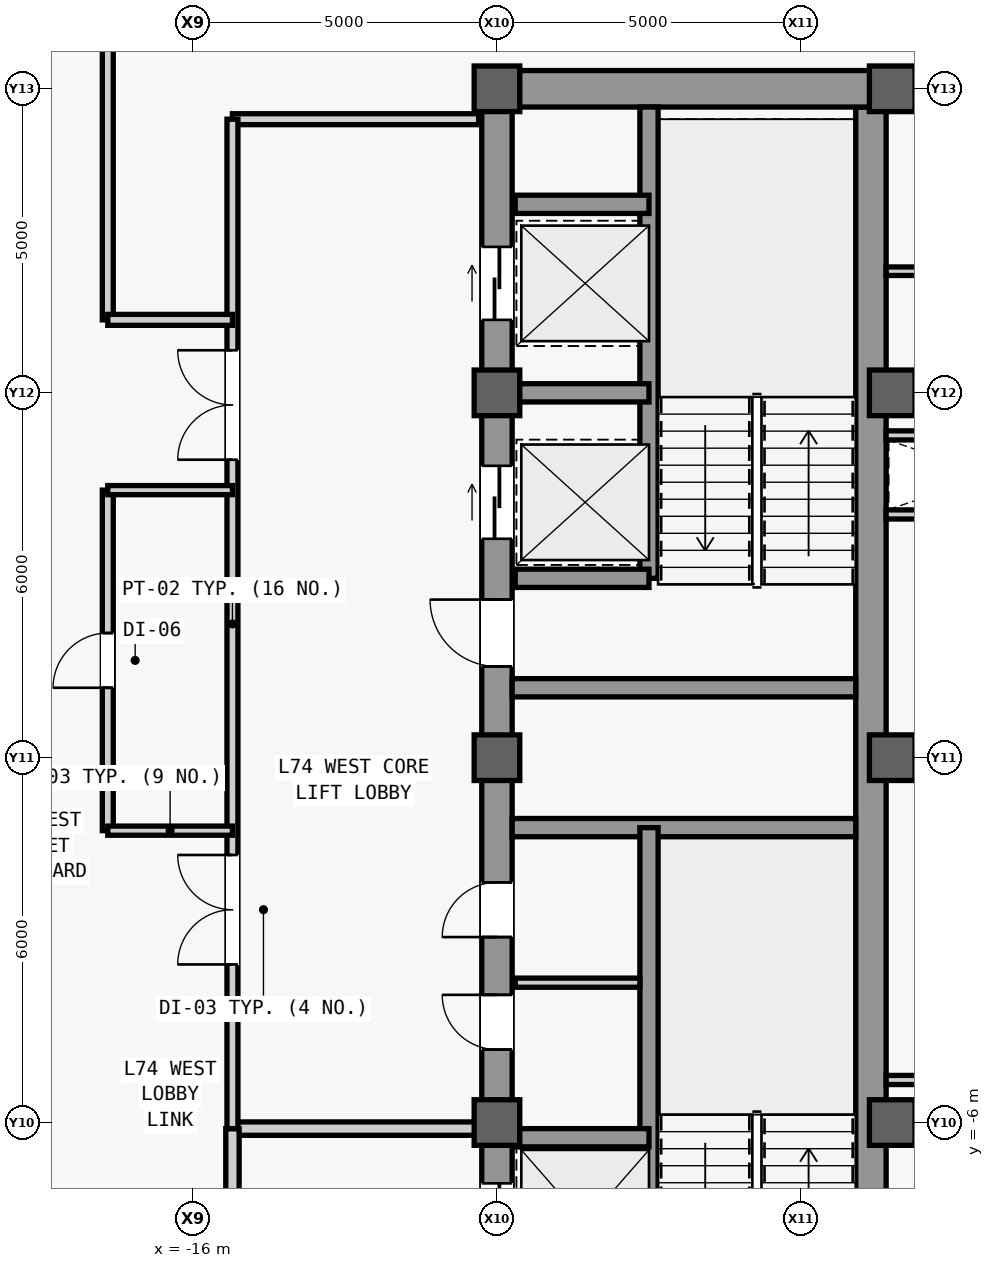
"""IFC4 building model, lengths in metres.
Left out: names, types, materials, properties, quantities, classifications, styles, units other than length and angle.
Written with IfcOpenShell. Run it as: python <this file> out.ifc"""

import sys

from ifc_helpers import new_model, si_unit, direction, frame, frame_2d, origin, origin_2d, place, context, subcontext, project, spatial, rectangle, extrude, source, transform, mapped, element, fill, save


model = new_model("IFC4")
c1 = context("Model", 3, precision=1e-05, world=origin(), true_north=direction((0.0, 1.0)))
c2 = subcontext(c1, "Body", "Model", "MODEL_VIEW")
j1 = project(units=[si_unit("LENGTHUNIT", "METRE"), si_unit("PLANEANGLEUNIT", "RADIAN")], contexts=[c1])
p1 = place(None, origin())
s1 = spatial("IfcSite", under=j1, at=p1, CompositionType="ELEMENT")
p2 = place(p1, origin())
s2 = spatial("IfcBuilding", under=s1, at=p2, CompositionType="ELEMENT")
p3 = place(p2, frame((0.0, 0.0, 313.5)))
s3 = spatial("IfcBuildingStorey", under=s2, at=p3, CompositionType="ELEMENT", Elevation=313.5)
m1 = source(origin(), c2, "Body", "SweptSolid", [
    extrude(rectangle(XDim=22.0, YDim=0.5, at=frame_2d((11.0, 0.0))), origin(), (0.0, 0.0, 1.0), 3.78),
])
p4 = place(p3, frame((-11.0, -11.0, 0.0), z_axis=(0.0, 0.0, 1.0), x_axis=(0.0, 1.0, 0.0)))
e1 = element("IfcWall", 1, at=p4, inside=s3, PredefinedType="SHEAR", context=c2, shape_type="MappedRepresentation", body=[
    mapped(m1, transform((0.0, 0.0, 0.0), scale=1.0)),
])
m2 = source(origin(), c2, "Body", "SweptSolid", [
    extrude(rectangle(XDim=1.1, YDim=2.2, at=frame_2d((0.55, 1.1))), frame((0.0, 0.26, 0.0), z_axis=(0.0, -1.0, 0.0), x_axis=(1.0, 0.0, 0.0)), (0.0, 0.0, 1.0), 0.52),
])
p5 = place(p4, frame((0.8, 0.0, 0.0)))
e2 = element("IfcOpeningElement", 2, at=p5, cuts=e1, PredefinedType="OPENING", context=c2, shape_type="MappedRepresentation", body=[
    mapped(m2, transform((0.0, 0.0, 0.0), scale=1.0)),
])
p6 = place(p4, frame((12.5, 0.0, 0.0)))
e3 = element("IfcOpeningElement", 3, at=p6, cuts=e1, PredefinedType="OPENING", context=c2, shape_type="MappedRepresentation", body=[
    mapped(m2, transform((0.0, 0.0, 0.0), scale=1.0)),
])
m3 = source(origin(), c2, "Body", "SweptSolid", [
    extrude(rectangle(XDim=0.9, YDim=2.15, at=frame_2d((0.45, 1.075))), frame((0.0, 0.26, 0.0), z_axis=(0.0, -1.0, 0.0), x_axis=(1.0, 0.0, 0.0)), (0.0, 0.0, 1.0), 0.52),
])
p7 = place(p4, frame((6.2, 0.0, 0.0)))
e4 = element("IfcOpeningElement", 4, at=p7, cuts=e1, PredefinedType="OPENING", context=c2, shape_type="MappedRepresentation", body=[
    mapped(m3, transform((0.0, 0.0, 0.0), scale=1.0)),
])
p8 = place(p4, frame((8.05, 0.0, 0.0)))
e5 = element("IfcOpeningElement", 5, at=p8, cuts=e1, PredefinedType="OPENING", context=c2, shape_type="MappedRepresentation", body=[
    mapped(m3, transform((0.0, 0.0, 0.0), scale=1.0)),
])
m4 = source(origin(), c2, "Body", "SweptSolid", [
    extrude(rectangle(XDim=1.2, YDim=2.3, at=frame_2d((0.6, 1.15))), frame((0.0, 0.26, 0.0), z_axis=(0.0, -1.0, 0.0), x_axis=(1.0, 0.0, 0.0)), (0.0, 0.0, 1.0), 0.52),
])
p9 = place(p4, frame((14.6, 0.0, 0.0)))
e6 = element("IfcOpeningElement", 6, at=p9, cuts=e1, PredefinedType="OPENING", context=c2, shape_type="MappedRepresentation", body=[
    mapped(m4, transform((0.0, 0.0, 0.0), scale=1.0)),
])
p10 = place(p4, frame((18.2, 0.0, 0.0)))
e7 = element("IfcOpeningElement", 7, at=p10, cuts=e1, PredefinedType="OPENING", context=c2, shape_type="MappedRepresentation", body=[
    mapped(m4, transform((0.0, 0.0, 0.0), scale=1.0)),
])
m5 = source(origin(), c2, "Body", "SweptSolid", [
    extrude(rectangle(XDim=1.3, YDim=2.3, at=frame_2d((0.65, 1.15))), frame((0.0, 0.26, 0.0), z_axis=(0.0, -1.0, 0.0), x_axis=(1.0, 0.0, 0.0)), (0.0, 0.0, 1.0), 0.52),
])
p11 = place(p4, frame((2.7, 0.0, 0.0)))
e8 = element("IfcOpeningElement", 8, at=p11, cuts=e1, PredefinedType="OPENING", context=c2, shape_type="MappedRepresentation", body=[
    mapped(m5, transform((0.0, 0.0, 0.0), scale=1.0)),
])
m6 = source(origin(), c2, "Body", "SweptSolid", [
    extrude(rectangle(XDim=21.4, YDim=0.5, at=frame_2d((10.7, 0.0))), origin(), (0.0, 0.0, 1.0), 3.78),
])
p12 = place(p3, frame((-4.85, -10.7, 0.0), z_axis=(0.0, 0.0, 1.0), x_axis=(0.0, 1.0, 0.0)))
e9 = element("IfcWall", 9, at=p12, inside=s3, PredefinedType="SHEAR", context=c2, shape_type="MappedRepresentation", body=[
    mapped(m6, transform((0.0, 0.0, 0.0), scale=1.0)),
])
m7 = source(origin(), c2, "Body", "SweptSolid", [
    extrude(rectangle(XDim=5.9, YDim=0.6, at=frame_2d((2.95, 0.0))), origin(), (0.0, 0.0, 1.0), 3.78),
])
p13 = place(p3, frame((-10.75, 11.0, 0.0), z_axis=(0.0, 0.0, 1.0), x_axis=(1.0, 0.0, 0.0)))
e10 = element("IfcWall", 10, at=p13, inside=s3, PredefinedType="SHEAR", context=c2, shape_type="MappedRepresentation", body=[
    mapped(m7, transform((0.0, 0.0, 0.0), scale=1.0)),
])
m8 = source(origin(), c2, "Body", "SweptSolid", [
    extrude(rectangle(XDim=5.65, YDim=0.3, at=frame_2d((2.825, 0.0))), origin(), (0.0, 0.0, 1.0), 3.78),
])
for number, where, z_axis, x_axis in (
    (11, (-10.75, -1.15, 0.0), (0.0, 0.0, 1.0), (1.0, 0.0, 0.0)),
    (12, (-10.75, 1.15, 0.0), (0.0, 0.0, 1.0), (1.0, 0.0, 0.0)),
):
    element("IfcWall", number, at=place(p3, frame(where, z_axis=z_axis, x_axis=x_axis)), inside=s3, PredefinedType="SHEAR", context=c2, shape_type="MappedRepresentation", body=[
        mapped(m8, transform((0.0, 0.0, 0.0), scale=1.0)),
    ])
m9 = source(origin(), c2, "Body", "SweptSolid", [
    extrude(rectangle(XDim=9.2, YDim=0.5, at=frame_2d((4.6, 0.0))), origin(), (0.0, 0.0, 1.0), 3.78),
])
p14 = place(p3, frame((-4.6, 11.0, 0.0), z_axis=(0.0, 0.0, 1.0), x_axis=(1.0, 0.0, 0.0)))
e13 = element("IfcWall", 13, at=p14, inside=s3, PredefinedType="SHEAR", context=c2, shape_type="MappedRepresentation", body=[
    mapped(m9, transform((0.0, 0.0, 0.0), scale=1.0)),
])
m10 = source(origin(), c2, "Body", "SweptSolid", [
    extrude(rectangle(XDim=0.75, YDim=0.75, at=origin_2d()), origin(), (0.0, 0.0, 1.0), 4.0),
])
for number, where, z_axis, x_axis in (
    (14, (-11.0, -6.0, 0.0), (0.0, 0.0, 1.0), (1.0, 0.0, 0.0)),
    (15, (-11.0, 0.0, 0.0), (0.0, 0.0, 1.0), (1.0, 0.0, 0.0)),
    (16, (-11.0, 6.0, 0.0), (0.0, 0.0, 1.0), (1.0, 0.0, 0.0)),
    (17, (-11.0, 11.0, 0.0), (0.0, 0.0, 1.0), (1.0, 0.0, 0.0)),
    (18, (-4.5, -6.0, 0.0), (0.0, 0.0, 1.0), (1.0, 0.0, 0.0)),
    (19, (-4.5, 0.0, 0.0), (0.0, 0.0, 1.0), (1.0, 0.0, 0.0)),
    (20, (-4.5, 6.0, 0.0), (0.0, 0.0, 1.0), (1.0, 0.0, 0.0)),
    (21, (-4.5, 11.0, 0.0), (0.0, 0.0, 1.0), (1.0, 0.0, 0.0)),
):
    element("IfcColumn", number, at=place(p3, frame(where, z_axis=z_axis, x_axis=x_axis)), inside=s3, PredefinedType="COLUMN", context=c2, shape_type="MappedRepresentation", body=[
        mapped(m10, transform((0.0, 0.0, 0.0), scale=1.0)),
    ])
m11 = source(origin(), c2, "Body", "SweptSolid", [
    extrude(rectangle(XDim=7.8, YDim=0.3, at=frame_2d((3.9, 0.0))), origin(), (0.0, 0.0, 1.0), 3.78),
])
p15 = place(p3, frame((-8.5, -8.95, 0.0), z_axis=(0.0, 0.0, 1.0), x_axis=(0.0, 1.0, 0.0)))
e22 = element("IfcWall", 22, at=p15, inside=s3, PredefinedType="SHEAR", context=c2, shape_type="MappedRepresentation", body=[
    mapped(m11, transform((0.0, 0.0, 0.0), scale=1.0)),
])
m12 = source(origin(), c2, "Body", "SweptSolid", [
    extrude(rectangle(XDim=2.2, YDim=0.3, at=frame_2d((1.1, 0.0))), origin(), (0.0, 0.0, 1.0), 3.78),
])
p16 = place(p3, frame((-10.7, -6.25, 0.0), z_axis=(0.0, 0.0, 1.0), x_axis=(1.0, 0.0, 0.0)))
e23 = element("IfcWall", 23, at=p16, inside=s3, PredefinedType="SHEAR", context=c2, shape_type="MappedRepresentation", body=[
    mapped(m12, transform((0.0, 0.0, 0.0), scale=1.0)),
])
m13 = source(origin(), c2, "Body", "SweptSolid", [
    extrude(rectangle(XDim=7.75, YDim=0.3, at=frame_2d((3.875, 0.0))), origin(), (0.0, 0.0, 1.0), 3.78),
])
p17 = place(p3, frame((-8.5, 2.95, 0.0), z_axis=(0.0, 0.0, 1.0), x_axis=(0.0, 1.0, 0.0)))
e24 = element("IfcWall", 24, at=p17, inside=s3, PredefinedType="SHEAR", context=c2, shape_type="MappedRepresentation", body=[
    mapped(m13, transform((0.0, 0.0, 0.0), scale=1.0)),
])
for number, where, z_axis, x_axis in (
    (25, (-10.7, 2.95, 0.0), (0.0, 0.0, 1.0), (1.0, 0.0, 0.0)),
    (26, (-10.7, 6.0, 0.0), (0.0, 0.0, 1.0), (1.0, 0.0, 0.0)),
    (27, (-10.7, 9.1, 0.0), (0.0, 0.0, 1.0), (1.0, 0.0, 0.0)),
):
    element("IfcWall", number, at=place(p3, frame(where, z_axis=z_axis, x_axis=x_axis)), inside=s3, PredefinedType="SHEAR", context=c2, shape_type="MappedRepresentation", body=[
        mapped(m12, transform((0.0, 0.0, 0.0), scale=1.0)),
    ])
m14 = source(origin(), c2, "Body", "SweptSolid", [
    extrude(rectangle(XDim=2.05, YDim=0.15, at=frame_2d((1.025, 0.0))), origin(), (0.0, 0.0, 1.0), 3.78),
])
p18 = place(p3, frame((-10.7, -3.7, 0.0), z_axis=(0.0, 0.0, 1.0), x_axis=(1.0, 0.0, 0.0)))
e28 = element("IfcWall", 28, at=p18, inside=s3, PredefinedType="PARTITIONING", context=c2, shape_type="MappedRepresentation", body=[
    mapped(m14, transform((0.0, 0.0, 0.0), scale=1.0)),
])
m15 = source(origin(), c2, "Body", "SweptSolid", [
    extrude(rectangle(XDim=4.05, YDim=0.22, at=frame_2d((2.025, 0.0))), origin(), (0.0, 0.0, 1.0), 3.085),
])
p19 = place(p3, frame((-15.35, -6.1, 0.0), z_axis=(0.0, 0.0, 1.0), x_axis=(1.0, 0.0, 0.0)))
e29 = element("IfcWall", 29, at=p19, inside=s3, PredefinedType="PARTITIONING", context=c2, shape_type="MappedRepresentation", body=[
    mapped(m15, transform((0.0, 0.0, 0.0), scale=1.0)),
])
m16 = source(origin(), c2, "Body", "SweptSolid", [
    extrude(rectangle(XDim=4.4, YDim=0.22, at=frame_2d((2.2, 0.0))), origin(), (0.0, 0.0, 1.0), 3.78),
])
p20 = place(p3, frame((-15.35, -10.5, 0.0), z_axis=(0.0, 0.0, 1.0), x_axis=(0.0, 1.0, 0.0)))
e30 = element("IfcWall", 30, at=p20, inside=s3, PredefinedType="PARTITIONING", context=c2, shape_type="MappedRepresentation", body=[
    mapped(m16, transform((0.0, 0.0, 0.0), scale=1.0)),
])
m17 = source(origin(), c2, "Body", "SweptSolid", [
    extrude(rectangle(XDim=1.2, YDim=2.2, at=frame_2d((0.6, 1.1))), frame((0.0, 0.12, 0.0), z_axis=(0.0, -1.0, 0.0), x_axis=(1.0, 0.0, 0.0)), (0.0, 0.0, 1.0), 0.24),
])
p21 = place(p20, frame((1.6, 0.0, 0.0)))
e31 = element("IfcOpeningElement", 31, at=p21, cuts=e30, PredefinedType="OPENING", context=c2, shape_type="MappedRepresentation", body=[
    mapped(m17, transform((0.0, 0.0, 0.0), scale=1.0)),
])
m18 = source(origin(), c2, "Body", "SweptSolid", [
    extrude(rectangle(XDim=4.05, YDim=0.18, at=frame_2d((2.025, 0.0))), origin(), (0.0, 0.0, 1.0), 3.78),
])
p22 = place(p3, frame((-15.35, 10.5, 0.0), z_axis=(0.0, 0.0, 1.0), x_axis=(1.0, 0.0, 0.0)))
e32 = element("IfcWall", 32, at=p22, inside=s3, PredefinedType="PARTITIONING", context=c2, shape_type="MappedRepresentation", body=[
    mapped(m18, transform((0.0, 0.0, 0.0), scale=1.0)),
])
m19 = source(origin(), c2, "Body", "SweptSolid", [
    extrude(rectangle(XDim=16.6, YDim=0.18, at=frame_2d((8.3, 0.0))), origin(), (0.0, 0.0, 1.0), 3.78),
])
p23 = place(p3, frame((-15.35, -6.1, 0.0), z_axis=(0.0, 0.0, 1.0), x_axis=(0.0, 1.0, 0.0)))
e33 = element("IfcWall", 33, at=p23, inside=s3, PredefinedType="PARTITIONING", context=c2, shape_type="MappedRepresentation", body=[
    mapped(m19, transform((0.0, 0.0, 0.0), scale=1.0)),
])
m20 = source(origin(), c2, "Body", "SweptSolid", [
    extrude(rectangle(XDim=1.8, YDim=2.25, at=frame_2d((0.9, 1.125))), frame((0.0, 0.1, 0.0), z_axis=(0.0, -1.0, 0.0), x_axis=(1.0, 0.0, 0.0)), (0.0, 0.0, 1.0), 0.2),
])
p24 = place(p23, frame((2.7, 0.0, 0.0)))
e34 = element("IfcOpeningElement", 34, at=p24, cuts=e33, PredefinedType="OPENING", context=c2, shape_type="MappedRepresentation", body=[
    mapped(m20, transform((0.0, 0.0, 0.0), scale=1.0)),
])
p25 = place(p23, frame((11.0, 0.0, 0.0)))
e35 = element("IfcOpeningElement", 35, at=p25, cuts=e33, PredefinedType="OPENING", context=c2, shape_type="MappedRepresentation", body=[
    mapped(m20, transform((0.0, 0.0, 0.0), scale=1.0)),
])
m21 = source(origin(), c2, "Body", "SweptSolid", [
    extrude(rectangle(XDim=3.45, YDim=0.15, at=frame_2d((1.725, 0.0))), origin(), (0.0, 0.0, 1.0), 3.78),
])
for number, where, z_axis, x_axis in (
    (36, (-4.6, 4.0, 0.0), (0.0, 0.0, 1.0), (1.0, 0.0, 0.0)),
    (37, (-4.6, -5.3, 0.0), (0.0, 0.0, 1.0), (1.0, 0.0, 0.0)),
):
    element("IfcWall", number, at=place(p3, frame(where, z_axis=z_axis, x_axis=x_axis)), inside=s3, PredefinedType="PARTITIONING", context=c2, shape_type="MappedRepresentation", body=[
        mapped(m21, transform((0.0, 0.0, 0.0), scale=1.0)),
    ])
m22 = source(origin(), c2, "Body", "SweptSolid", [
    extrude(rectangle(XDim=3.45, YDim=0.14, at=frame_2d((1.725, 0.0))), origin(), (0.0, 0.0, 1.0), 3.78),
])
p26 = place(p3, frame((-4.6, 8.0, 0.0), z_axis=(0.0, 0.0, 1.0), x_axis=(1.0, 0.0, 0.0)))
e38 = element("IfcWall", 38, at=p26, inside=s3, PredefinedType="PARTITIONING", context=c2, shape_type="MappedRepresentation", body=[
    mapped(m22, transform((0.0, 0.0, 0.0), scale=1.0)),
])
p27 = place(p3, frame((-4.6, 5.3, 0.0), z_axis=(0.0, 0.0, 1.0), x_axis=(1.0, 0.0, 0.0)))
e39 = element("IfcWall", 39, at=p27, inside=s3, PredefinedType="PARTITIONING", context=c2, shape_type="MappedRepresentation", body=[
    mapped(m21, transform((0.0, 0.0, 0.0), scale=1.0)),
])
m23 = source(origin(), c2, "Body", "SweptSolid", [
    extrude(rectangle(XDim=5.6, YDim=0.18, at=frame_2d((2.8, 0.0))), origin(), (0.0, 0.0, 1.0), 3.78),
])
p28 = place(p3, frame((-17.4, -1.2, 0.0), z_axis=(0.0, 0.0, 1.0), x_axis=(0.0, 1.0, 0.0)))
e40 = element("IfcWall", 40, at=p28, inside=s3, PredefinedType="PARTITIONING", context=c2, shape_type="MappedRepresentation", body=[
    mapped(m23, transform((0.0, 0.0, 0.0), scale=1.0)),
])
m24 = source(origin(), c2, "Body", "SweptSolid", [
    extrude(rectangle(XDim=0.9, YDim=2.15, at=frame_2d((0.45, 1.075))), frame((0.0, 0.1, 0.0), z_axis=(0.0, -1.0, 0.0), x_axis=(1.0, 0.0, 0.0)), (0.0, 0.0, 1.0), 0.2),
])
p29 = place(p28, frame((2.35, 0.0, 0.0)))
e41 = element("IfcOpeningElement", 41, at=p29, cuts=e40, PredefinedType="OPENING", context=c2, shape_type="MappedRepresentation", body=[
    mapped(m24, transform((0.0, 0.0, 0.0), scale=1.0)),
])
m25 = source(origin(), c2, "Body", "SweptSolid", [
    extrude(rectangle(XDim=2.05, YDim=0.15, at=frame_2d((1.025, 0.0))), origin(), (0.0, 0.0, 1.0), 3.78),
])
for number, where, z_axis, x_axis in (
    (42, (-17.4, -1.2, 0.0), (0.0, 0.0, 1.0), (1.0, 0.0, 0.0)),
    (43, (-17.4, 4.4, 0.0), (0.0, 0.0, 1.0), (1.0, 0.0, 0.0)),
):
    element("IfcWall", number, at=place(p3, frame(where, z_axis=z_axis, x_axis=x_axis)), inside=s3, PredefinedType="PARTITIONING", context=c2, shape_type="MappedRepresentation", body=[
        mapped(m25, transform((0.0, 0.0, 0.0), scale=1.0)),
    ])
m26 = source(origin(), c2, "Body", "SweptSolid", [
    extrude(rectangle(XDim=8.4, YDim=0.18, at=frame_2d((4.2, 0.0))), origin(), (0.0, 0.0, 1.0), 3.78),
])
p30 = place(p3, frame((-17.4, 7.2, 0.0), z_axis=(0.0, 0.0, 1.0), x_axis=(0.0, 1.0, 0.0)))
e44 = element("IfcWall", 44, at=p30, inside=s3, PredefinedType="PARTITIONING", context=c2, shape_type="MappedRepresentation", body=[
    mapped(m26, transform((0.0, 0.0, 0.0), scale=1.0)),
])
m27 = source(origin(), c2, "Body", "SweptSolid", [
    extrude(rectangle(XDim=2.05, YDim=0.18, at=frame_2d((1.025, 0.0))), origin(), (0.0, 0.0, 1.0), 3.78),
])
p31 = place(p3, frame((-17.4, 7.2, 0.0), z_axis=(0.0, 0.0, 1.0), x_axis=(1.0, 0.0, 0.0)))
e45 = element("IfcWall", 45, at=p31, inside=s3, PredefinedType="PARTITIONING", context=c2, shape_type="MappedRepresentation", body=[
    mapped(m27, transform((0.0, 0.0, 0.0), scale=1.0)),
])
m28 = source(origin(), c2, "Body", "SweptSolid", [
    extrude(rectangle(XDim=1.1, YDim=2.2, at=frame_2d((0.55, 1.1))), frame((0.0, 0.025, 0.0), z_axis=(0.0, -1.0, 0.0), x_axis=(1.0, 0.0, 0.0)), (0.0, 0.0, 1.0), 0.05),
])
p32 = place(p6, origin())
e46 = element("IfcDoor", 46, at=p32, inside=s3, OperationType="SINGLE_SWING_RIGHT", PredefinedType="DOOR", context=c2, shape_type="MappedRepresentation", body=[
    mapped(m28, transform((0.0, 0.0, 0.0), scale=1.0)),
])
fill(e3, e46)
m29 = source(origin(), c2, "Body", "SweptSolid", [
    extrude(rectangle(XDim=0.9, YDim=2.15, at=frame_2d((0.45, 1.075))), frame((0.0, 0.025, 0.0), z_axis=(0.0, -1.0, 0.0), x_axis=(1.0, 0.0, 0.0)), (0.0, 0.0, 1.0), 0.05),
])
p33 = place(p7, origin())
e47 = element("IfcDoor", 47, at=p33, inside=s3, OperationType="SINGLE_SWING_RIGHT", PredefinedType="DOOR", context=c2, shape_type="MappedRepresentation", body=[
    mapped(m29, transform((0.0, 0.0, 0.0), scale=1.0)),
])
fill(e4, e47)
p34 = place(p8, origin())
e48 = element("IfcDoor", 48, at=p34, inside=s3, OperationType="SINGLE_SWING_LEFT", PredefinedType="DOOR", context=c2, shape_type="MappedRepresentation", body=[
    mapped(m29, transform((0.0, 0.0, 0.0), scale=1.0)),
])
fill(e5, e48)
m30 = source(origin(), c2, "Body", "SweptSolid", [
    extrude(rectangle(XDim=1.8, YDim=2.25, at=frame_2d((0.9, 1.125))), frame((0.0, 0.025, 0.0), z_axis=(0.0, -1.0, 0.0), x_axis=(1.0, 0.0, 0.0)), (0.0, 0.0, 1.0), 0.05),
])
p35 = place(p24, origin())
e49 = element("IfcDoor", 49, at=p35, inside=s3, OperationType="SINGLE_SWING_LEFT", PredefinedType="DOOR", context=c2, shape_type="MappedRepresentation", body=[
    mapped(m30, transform((0.0, 0.0, 0.0), scale=1.0)),
])
fill(e34, e49)
p36 = place(p25, origin())
e50 = element("IfcDoor", 50, at=p36, inside=s3, OperationType="SINGLE_SWING_RIGHT", PredefinedType="DOOR", context=c2, shape_type="MappedRepresentation", body=[
    mapped(m30, transform((0.0, 0.0, 0.0), scale=1.0)),
])
fill(e35, e50)
p37 = place(p29, origin())
e51 = element("IfcDoor", 51, at=p37, inside=s3, OperationType="SINGLE_SWING_LEFT", PredefinedType="DOOR", context=c2, shape_type="MappedRepresentation", body=[
    mapped(m29, transform((0.0, 0.0, 0.0), scale=1.0)),
])
fill(e41, e51)
m31 = source(origin(), c2, "Body", "SweptSolid", [
    extrude(rectangle(XDim=1.2, YDim=2.3, at=frame_2d((0.6, 1.15))), frame((0.0, 0.025, 0.0), z_axis=(0.0, -1.0, 0.0), x_axis=(1.0, 0.0, 0.0)), (0.0, 0.0, 1.0), 0.05),
])
p38 = place(p9, origin())
e52 = element("IfcDoor", 52, at=p38, inside=s3, OperationType="SLIDING_TO_LEFT", PredefinedType="DOOR", context=c2, shape_type="MappedRepresentation", body=[
    mapped(m31, transform((0.0, 0.0, 0.0), scale=1.0)),
])
fill(e6, e52)
p39 = place(p10, origin())
e53 = element("IfcDoor", 53, at=p39, inside=s3, OperationType="SLIDING_TO_LEFT", PredefinedType="DOOR", context=c2, shape_type="MappedRepresentation", body=[
    mapped(m31, transform((0.0, 0.0, 0.0), scale=1.0)),
])
fill(e7, e53)
m32 = source(origin(), c2, "Body", "SweptSolid", [
    extrude(rectangle(XDim=1.3, YDim=2.3, at=frame_2d((0.65, 1.15))), frame((0.0, 0.025, 0.0), z_axis=(0.0, -1.0, 0.0), x_axis=(1.0, 0.0, 0.0)), (0.0, 0.0, 1.0), 0.05),
])
p40 = place(p11, origin())
e54 = element("IfcDoor", 54, at=p40, inside=s3, OperationType="SLIDING_TO_LEFT", PredefinedType="DOOR", context=c2, shape_type="MappedRepresentation", body=[
    mapped(m32, transform((0.0, 0.0, 0.0), scale=1.0)),
])
fill(e8, e54)
save(model, sys.argv[1])
